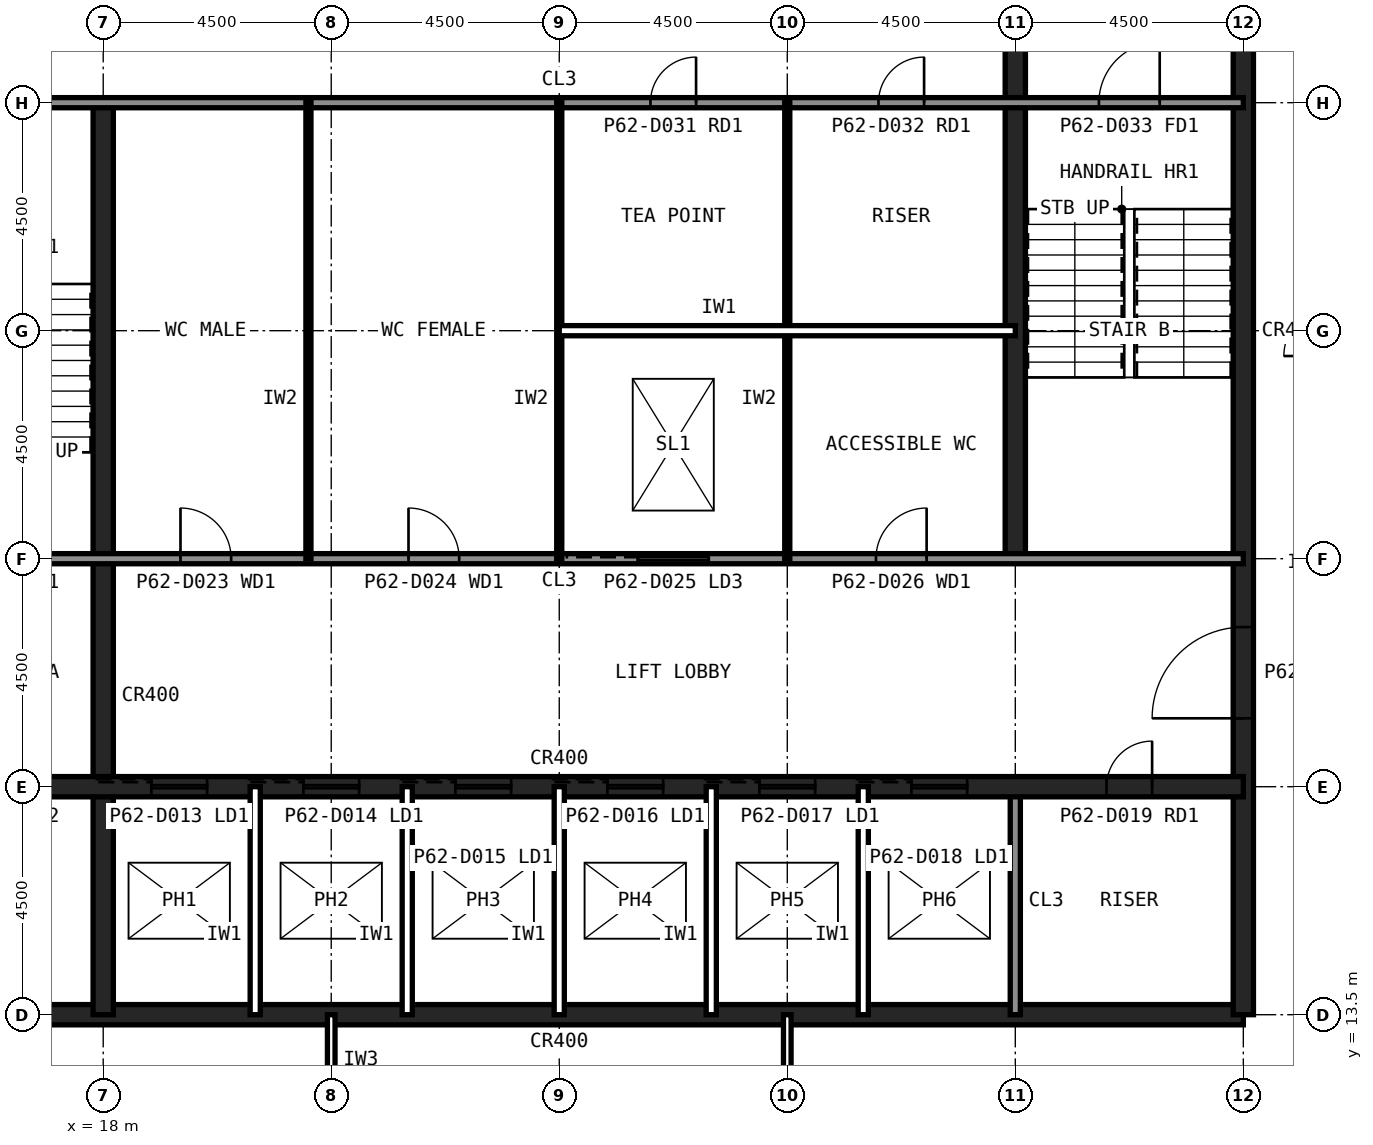
"""IFC4 building model, lengths in metres.
Left out: names, types, materials, properties, quantities, classifications, styles, units other than length and angle.
Written with IfcOpenShell. Run it as: python <this file> out.ifc"""

import sys

from ifc_helpers import new_model, si_unit, direction, frame, frame_2d, origin, place, context, subcontext, project, spatial, rectangle, extrude, element, fill, save


model = new_model("IFC4")
c1 = context("Model", 3, precision=1e-05, world=origin(), true_north=direction((0.0, 1.0)))
c2 = subcontext(c1, "Body", "Model", "MODEL_VIEW")
j1 = project(units=[si_unit("LENGTHUNIT", "METRE"), si_unit("PLANEANGLEUNIT", "RADIAN")], contexts=[c1])
p1 = place(None, origin())
s1 = spatial("IfcSite", under=j1, at=p1, CompositionType="ELEMENT")
p2 = place(p1, origin())
s2 = spatial("IfcBuilding", under=s1, at=p2, CompositionType="ELEMENT")
p3 = place(p2, frame((0.0, 0.0, 262.6)))
s3 = spatial("IfcBuildingStorey", under=s2, at=p3, CompositionType="ELEMENT", Elevation=262.6)
p4 = place(p3, frame((13.5, 13.5, 0.0), z_axis=(0.0, 0.0, 1.0), x_axis=(1.0, 0.0, 0.0)))
e1 = element("IfcWall", 1, at=p4, inside=s3, PredefinedType="SHEAR", context=c2, shape_type="SweptSolid", body=[
    extrude(rectangle(XDim=27.0, YDim=0.4, at=frame_2d((13.5, 0.0))), origin(), (0.0, 0.0, 1.0), 4.0),
])
p5 = place(p3, frame((40.5, 13.5, 0.0), z_axis=(0.0, 0.0, 1.0), x_axis=(0.0, 1.0, 0.0)))
e2 = element("IfcWall", 2, at=p5, inside=s3, PredefinedType="SHEAR", context=c2, shape_type="SweptSolid", body=[
    extrude(rectangle(XDim=27.0, YDim=0.4, at=frame_2d((13.5, 0.0))), origin(), (0.0, 0.0, 1.0), 4.0),
])
p6 = place(p5, frame((5.85, 0.0, 0.0)))
e3 = element("IfcOpeningElement", 3, at=p6, cuts=e2, PredefinedType="OPENING", context=c2, shape_type="SweptSolid", body=[
    extrude(rectangle(XDim=1.8, YDim=2.1, at=frame_2d((0.9, 1.05))), frame((0.0, 0.21, 0.0), z_axis=(0.0, -1.0, 0.0), x_axis=(1.0, 0.0, 0.0)), (0.0, 0.0, 1.0), 0.42),
])
p7 = place(p5, frame((19.65, 0.0, 0.0)))
e4 = element("IfcOpeningElement", 4, at=p7, cuts=e2, PredefinedType="OPENING", context=c2, shape_type="SweptSolid", body=[
    extrude(rectangle(XDim=1.2, YDim=2.1, at=frame_2d((0.6, 1.05))), frame((0.0, 0.21, 0.0), z_axis=(0.0, -1.0, 0.0), x_axis=(1.0, 0.0, 0.0)), (0.0, 0.0, 1.0), 0.42),
])
p8 = place(p3, frame((18.0, 13.5, 0.0), z_axis=(0.0, 0.0, 1.0), x_axis=(0.0, 1.0, 0.0)))
e5 = element("IfcWall", 5, at=p8, inside=s3, PredefinedType="SHEAR", context=c2, shape_type="SweptSolid", body=[
    extrude(rectangle(XDim=18.0, YDim=0.4, at=frame_2d((9.0, 0.0))), origin(), (0.0, 0.0, 1.0), 4.0),
])
p9 = place(p3, frame((36.0, 13.5, 0.0), z_axis=(0.0, 0.0, 1.0), x_axis=(0.0, 1.0, 0.0)))
e6 = element("IfcWall", 6, at=p9, inside=s3, PredefinedType="SOLIDWALL", context=c2, shape_type="SweptSolid", body=[
    extrude(rectangle(XDim=4.5, YDim=0.2, at=frame_2d((2.25, 0.0))), origin(), (0.0, 0.0, 1.0), 3.84),
])
p10 = place(p3, frame((36.0, 22.5, 0.0), z_axis=(0.0, 0.0, 1.0), x_axis=(0.0, 1.0, 0.0)))
e7 = element("IfcWall", 7, at=p10, inside=s3, PredefinedType="SHEAR", context=c2, shape_type="SweptSolid", body=[
    extrude(rectangle(XDim=18.0, YDim=0.4, at=frame_2d((9.0, 0.0))), origin(), (0.0, 0.0, 1.0), 4.0),
])
p11 = place(p3, frame((13.5, 18.0, 0.0), z_axis=(0.0, 0.0, 1.0), x_axis=(1.0, 0.0, 0.0)))
e8 = element("IfcWall", 8, at=p11, inside=s3, PredefinedType="SHEAR", context=c2, shape_type="SweptSolid", body=[
    extrude(rectangle(XDim=27.0, YDim=0.4, at=frame_2d((13.5, 0.0))), origin(), (0.0, 0.0, 1.0), 4.0),
])
p12 = place(p11, frame((24.3, 0.0, 0.0)))
e9 = element("IfcOpeningElement", 9, at=p12, cuts=e8, PredefinedType="OPENING", context=c2, shape_type="SweptSolid", body=[
    extrude(rectangle(XDim=0.9, YDim=2.1, at=frame_2d((0.45, 1.05))), frame((0.0, 0.21, 0.0), z_axis=(0.0, -1.0, 0.0), x_axis=(1.0, 0.0, 0.0)), (0.0, 0.0, 1.0), 0.42),
])
p13 = place(p11, frame((5.45, 0.0, 0.0)))
e10 = element("IfcOpeningElement", 10, at=p13, cuts=e8, PredefinedType="OPENING", context=c2, shape_type="SweptSolid", body=[
    extrude(rectangle(XDim=1.1, YDim=2.1, at=frame_2d((0.55, 1.05))), frame((0.0, 0.21, 0.0), z_axis=(0.0, -1.0, 0.0), x_axis=(1.0, 0.0, 0.0)), (0.0, 0.0, 1.0), 0.42),
])
p14 = place(p11, frame((8.45, 0.0, 0.0)))
e11 = element("IfcOpeningElement", 11, at=p14, cuts=e8, PredefinedType="OPENING", context=c2, shape_type="SweptSolid", body=[
    extrude(rectangle(XDim=1.1, YDim=2.1, at=frame_2d((0.55, 1.05))), frame((0.0, 0.21, 0.0), z_axis=(0.0, -1.0, 0.0), x_axis=(1.0, 0.0, 0.0)), (0.0, 0.0, 1.0), 0.42),
])
p15 = place(p11, frame((11.45, 0.0, 0.0)))
e12 = element("IfcOpeningElement", 12, at=p15, cuts=e8, PredefinedType="OPENING", context=c2, shape_type="SweptSolid", body=[
    extrude(rectangle(XDim=1.1, YDim=2.1, at=frame_2d((0.55, 1.05))), frame((0.0, 0.21, 0.0), z_axis=(0.0, -1.0, 0.0), x_axis=(1.0, 0.0, 0.0)), (0.0, 0.0, 1.0), 0.42),
])
p16 = place(p11, frame((14.45, 0.0, 0.0)))
e13 = element("IfcOpeningElement", 13, at=p16, cuts=e8, PredefinedType="OPENING", context=c2, shape_type="SweptSolid", body=[
    extrude(rectangle(XDim=1.1, YDim=2.1, at=frame_2d((0.55, 1.05))), frame((0.0, 0.21, 0.0), z_axis=(0.0, -1.0, 0.0), x_axis=(1.0, 0.0, 0.0)), (0.0, 0.0, 1.0), 0.42),
])
p17 = place(p11, frame((17.45, 0.0, 0.0)))
e14 = element("IfcOpeningElement", 14, at=p17, cuts=e8, PredefinedType="OPENING", context=c2, shape_type="SweptSolid", body=[
    extrude(rectangle(XDim=1.1, YDim=2.1, at=frame_2d((0.55, 1.05))), frame((0.0, 0.21, 0.0), z_axis=(0.0, -1.0, 0.0), x_axis=(1.0, 0.0, 0.0)), (0.0, 0.0, 1.0), 0.42),
])
p18 = place(p11, frame((20.45, 0.0, 0.0)))
e15 = element("IfcOpeningElement", 15, at=p18, cuts=e8, PredefinedType="OPENING", context=c2, shape_type="SweptSolid", body=[
    extrude(rectangle(XDim=1.1, YDim=2.1, at=frame_2d((0.55, 1.05))), frame((0.0, 0.21, 0.0), z_axis=(0.0, -1.0, 0.0), x_axis=(1.0, 0.0, 0.0)), (0.0, 0.0, 1.0), 0.42),
])
p19 = place(p11, frame((1.6, 0.0, 0.0)))
e16 = element("IfcOpeningElement", 16, at=p19, cuts=e8, PredefinedType="OPENING", context=c2, shape_type="SweptSolid", body=[
    extrude(rectangle(XDim=1.3, YDim=2.2, at=frame_2d((0.65, 1.1))), frame((0.0, 0.21, 0.0), z_axis=(0.0, -1.0, 0.0), x_axis=(1.0, 0.0, 0.0)), (0.0, 0.0, 1.0), 0.42),
])
p20 = place(p3, frame((13.5, 22.5, 0.0), z_axis=(0.0, 0.0, 1.0), x_axis=(1.0, 0.0, 0.0)))
e17 = element("IfcWall", 17, at=p20, inside=s3, PredefinedType="SOLIDWALL", context=c2, shape_type="SweptSolid", body=[
    extrude(rectangle(XDim=27.0, YDim=0.2, at=frame_2d((13.5, 0.0))), origin(), (0.0, 0.0, 1.0), 3.84),
])
p21 = place(p20, frame((1.65, 0.0, 0.0)))
e18 = element("IfcOpeningElement", 18, at=p21, cuts=e17, PredefinedType="OPENING", context=c2, shape_type="SweptSolid", body=[
    extrude(rectangle(XDim=1.2, YDim=2.1, at=frame_2d((0.6, 1.05))), frame((0.0, 0.11, 0.0), z_axis=(0.0, -1.0, 0.0), x_axis=(1.0, 0.0, 0.0)), (0.0, 0.0, 1.0), 0.22),
])
p22 = place(p20, frame((6.025, 0.0, 0.0)))
e19 = element("IfcOpeningElement", 19, at=p22, cuts=e17, PredefinedType="OPENING", context=c2, shape_type="SweptSolid", body=[
    extrude(rectangle(XDim=1.0, YDim=2.1, at=frame_2d((0.5, 1.05))), frame((0.0, 0.11, 0.0), z_axis=(0.0, -1.0, 0.0), x_axis=(1.0, 0.0, 0.0)), (0.0, 0.0, 1.0), 0.22),
])
p23 = place(p20, frame((10.525, 0.0, 0.0)))
e20 = element("IfcOpeningElement", 20, at=p23, cuts=e17, PredefinedType="OPENING", context=c2, shape_type="SweptSolid", body=[
    extrude(rectangle(XDim=1.0, YDim=2.1, at=frame_2d((0.5, 1.05))), frame((0.0, 0.11, 0.0), z_axis=(0.0, -1.0, 0.0), x_axis=(1.0, 0.0, 0.0)), (0.0, 0.0, 1.0), 0.22),
])
p24 = place(p20, frame((19.75, 0.0, 0.0)))
e21 = element("IfcOpeningElement", 21, at=p24, cuts=e17, PredefinedType="OPENING", context=c2, shape_type="SweptSolid", body=[
    extrude(rectangle(XDim=1.0, YDim=2.1, at=frame_2d((0.5, 1.05))), frame((0.0, 0.11, 0.0), z_axis=(0.0, -1.0, 0.0), x_axis=(1.0, 0.0, 0.0)), (0.0, 0.0, 1.0), 0.22),
])
p25 = place(p20, frame((15.05, 0.0, 0.0)))
e22 = element("IfcOpeningElement", 22, at=p25, cuts=e17, PredefinedType="OPENING", context=c2, shape_type="SweptSolid", body=[
    extrude(rectangle(XDim=1.4, YDim=2.4, at=frame_2d((0.7, 1.2))), frame((0.0, 0.11, 0.0), z_axis=(0.0, -1.0, 0.0), x_axis=(1.0, 0.0, 0.0)), (0.0, 0.0, 1.0), 0.22),
])
p26 = place(p3, frame((13.5, 31.5, 0.0), z_axis=(0.0, 0.0, 1.0), x_axis=(1.0, 0.0, 0.0)))
e23 = element("IfcWall", 23, at=p26, inside=s3, PredefinedType="SOLIDWALL", context=c2, shape_type="SweptSolid", body=[
    extrude(rectangle(XDim=27.0, YDim=0.2, at=frame_2d((13.5, 0.0))), origin(), (0.0, 0.0, 1.0), 3.84),
])
p27 = place(p26, frame((24.15, 0.0, 0.0)))
e24 = element("IfcOpeningElement", 24, at=p27, cuts=e23, PredefinedType="OPENING", context=c2, shape_type="SweptSolid", body=[
    extrude(rectangle(XDim=1.2, YDim=2.1, at=frame_2d((0.6, 1.05))), frame((0.0, 0.11, 0.0), z_axis=(0.0, -1.0, 0.0), x_axis=(1.0, 0.0, 0.0)), (0.0, 0.0, 1.0), 0.22),
])
p28 = place(p26, frame((15.3, 0.0, 0.0)))
e25 = element("IfcOpeningElement", 25, at=p28, cuts=e23, PredefinedType="OPENING", context=c2, shape_type="SweptSolid", body=[
    extrude(rectangle(XDim=0.9, YDim=2.1, at=frame_2d((0.45, 1.05))), frame((0.0, 0.11, 0.0), z_axis=(0.0, -1.0, 0.0), x_axis=(1.0, 0.0, 0.0)), (0.0, 0.0, 1.0), 0.22),
])
p29 = place(p26, frame((19.8, 0.0, 0.0)))
e26 = element("IfcOpeningElement", 26, at=p29, cuts=e23, PredefinedType="OPENING", context=c2, shape_type="SweptSolid", body=[
    extrude(rectangle(XDim=0.9, YDim=2.1, at=frame_2d((0.45, 1.05))), frame((0.0, 0.11, 0.0), z_axis=(0.0, -1.0, 0.0), x_axis=(1.0, 0.0, 0.0)), (0.0, 0.0, 1.0), 0.22),
])
for number, where, z_axis, x_axis in (
    (27, (21.0, 13.5, 0.0), (0.0, 0.0, 1.0), (0.0, 1.0, 0.0)),
    (28, (24.0, 13.5, 0.0), (0.0, 0.0, 1.0), (0.0, 1.0, 0.0)),
    (29, (27.0, 13.5, 0.0), (0.0, 0.0, 1.0), (0.0, 1.0, 0.0)),
    (30, (30.0, 13.5, 0.0), (0.0, 0.0, 1.0), (0.0, 1.0, 0.0)),
    (31, (33.0, 13.5, 0.0), (0.0, 0.0, 1.0), (0.0, 1.0, 0.0)),
):
    element("IfcWall", number, at=place(p3, frame(where, z_axis=z_axis, x_axis=x_axis)), inside=s3, PredefinedType="PARTITIONING", context=c2, shape_type="SweptSolid", body=[
        extrude(rectangle(XDim=4.5, YDim=0.2, at=frame_2d((2.25, 0.0))), origin(), (0.0, 0.0, 1.0), 3.84),
    ])
for number, where, z_axis, x_axis in (
    (32, (22.05, 22.5, 0.0), (0.0, 0.0, 1.0), (0.0, 1.0, 0.0)),
    (33, (27.0, 22.5, 0.0), (0.0, 0.0, 1.0), (0.0, 1.0, 0.0)),
    (34, (31.5, 22.5, 0.0), (0.0, 0.0, 1.0), (0.0, 1.0, 0.0)),
):
    element("IfcWall", number, at=place(p3, frame(where, z_axis=z_axis, x_axis=x_axis)), inside=s3, PredefinedType="PLUMBINGWALL", context=c2, shape_type="SweptSolid", body=[
        extrude(rectangle(XDim=9.0, YDim=0.1, at=frame_2d((4.5, 0.0))), origin(), (0.0, 0.0, 1.0), 3.84),
    ])
p30 = place(p3, frame((27.0, 27.0, 0.0), z_axis=(0.0, 0.0, 1.0), x_axis=(1.0, 0.0, 0.0)))
e35 = element("IfcWall", 35, at=p30, inside=s3, PredefinedType="PARTITIONING", context=c2, shape_type="SweptSolid", body=[
    extrude(rectangle(XDim=9.0, YDim=0.2, at=frame_2d((4.5, 0.0))), origin(), (0.0, 0.0, 1.0), 3.84),
])
p31 = place(p3, frame((31.5, 9.0, 0.0), z_axis=(0.0, 0.0, 1.0), x_axis=(0.0, 1.0, 0.0)))
e36 = element("IfcWall", 36, at=p31, inside=s3, PredefinedType="PARTITIONING", context=c2, shape_type="SweptSolid", body=[
    extrude(rectangle(XDim=4.5, YDim=0.15, at=frame_2d((2.25, 0.0))), origin(), (0.0, 0.0, 1.0), 2.989),
])
p32 = place(p3, frame((22.5, 13.5, 0.0), z_axis=(0.0, 0.0, 1.0), x_axis=(0.0, -1.0, 0.0)))
e37 = element("IfcWall", 37, at=p32, inside=s3, PredefinedType="PARTITIONING", context=c2, shape_type="SweptSolid", body=[
    extrude(rectangle(XDim=4.5, YDim=0.15, at=frame_2d((2.25, 0.0))), origin(), (0.0, 0.0, 1.0), 2.989),
])
p33 = place(p32, frame((1.75, 0.0, 0.0)))
e38 = element("IfcOpeningElement", 38, at=p33, cuts=e37, PredefinedType="OPENING", context=c2, shape_type="SweptSolid", body=[
    extrude(rectangle(XDim=1.0, YDim=2.1, at=frame_2d((0.5, 1.05))), frame((0.0, 0.085, 0.0), z_axis=(0.0, -1.0, 0.0), x_axis=(1.0, 0.0, 0.0)), (0.0, 0.0, 1.0), 0.17),
])
p34 = place(p6, origin())
e39 = element("IfcDoor", 39, at=p34, inside=s3, OperationType="SINGLE_SWING_LEFT", PredefinedType="DOOR", context=c2, shape_type="SweptSolid", body=[
    extrude(rectangle(XDim=1.8, YDim=2.1, at=frame_2d((0.9, 1.05))), frame((0.0, 0.025, 0.0), z_axis=(0.0, -1.0, 0.0), x_axis=(1.0, 0.0, 0.0)), (0.0, 0.0, 1.0), 0.05),
])
fill(e3, e39)
p35 = place(p27, origin())
e40 = element("IfcDoor", 40, at=p35, inside=s3, OperationType="SINGLE_SWING_RIGHT", PredefinedType="DOOR", context=c2, shape_type="SweptSolid", body=[
    extrude(rectangle(XDim=1.2, YDim=2.1, at=frame_2d((0.6, 1.05))), frame((0.0, 0.025, 0.0), z_axis=(0.0, -1.0, 0.0), x_axis=(1.0, 0.0, 0.0)), (0.0, 0.0, 1.0), 0.05),
])
fill(e24, e40)
p36 = place(p22, origin())
e41 = element("IfcDoor", 41, at=p36, inside=s3, OperationType="SINGLE_SWING_LEFT", PredefinedType="DOOR", context=c2, shape_type="SweptSolid", body=[
    extrude(rectangle(XDim=1.0, YDim=2.1, at=frame_2d((0.5, 1.05))), frame((0.0, 0.025, 0.0), z_axis=(0.0, -1.0, 0.0), x_axis=(1.0, 0.0, 0.0)), (0.0, 0.0, 1.0), 0.05),
])
fill(e19, e41)
p37 = place(p23, origin())
e42 = element("IfcDoor", 42, at=p37, inside=s3, OperationType="SINGLE_SWING_LEFT", PredefinedType="DOOR", context=c2, shape_type="SweptSolid", body=[
    extrude(rectangle(XDim=1.0, YDim=2.1, at=frame_2d((0.5, 1.05))), frame((0.0, 0.025, 0.0), z_axis=(0.0, -1.0, 0.0), x_axis=(1.0, 0.0, 0.0)), (0.0, 0.0, 1.0), 0.05),
])
fill(e20, e42)
p38 = place(p24, origin())
e43 = element("IfcDoor", 43, at=p38, inside=s3, OperationType="SINGLE_SWING_RIGHT", PredefinedType="DOOR", context=c2, shape_type="SweptSolid", body=[
    extrude(rectangle(XDim=1.0, YDim=2.1, at=frame_2d((0.5, 1.05))), frame((0.0, 0.025, 0.0), z_axis=(0.0, -1.0, 0.0), x_axis=(1.0, 0.0, 0.0)), (0.0, 0.0, 1.0), 0.05),
])
fill(e21, e43)
p39 = place(p28, origin())
e44 = element("IfcDoor", 44, at=p39, inside=s3, OperationType="SINGLE_SWING_RIGHT", PredefinedType="DOOR", context=c2, shape_type="SweptSolid", body=[
    extrude(rectangle(XDim=0.9, YDim=2.1, at=frame_2d((0.45, 1.05))), frame((0.0, 0.025, 0.0), z_axis=(0.0, -1.0, 0.0), x_axis=(1.0, 0.0, 0.0)), (0.0, 0.0, 1.0), 0.05),
])
fill(e25, e44)
p40 = place(p29, origin())
e45 = element("IfcDoor", 45, at=p40, inside=s3, OperationType="SINGLE_SWING_RIGHT", PredefinedType="DOOR", context=c2, shape_type="SweptSolid", body=[
    extrude(rectangle(XDim=0.9, YDim=2.1, at=frame_2d((0.45, 1.05))), frame((0.0, 0.025, 0.0), z_axis=(0.0, -1.0, 0.0), x_axis=(1.0, 0.0, 0.0)), (0.0, 0.0, 1.0), 0.05),
])
fill(e26, e45)
p41 = place(p12, origin())
e46 = element("IfcDoor", 46, at=p41, inside=s3, OperationType="SINGLE_SWING_RIGHT", PredefinedType="DOOR", context=c2, shape_type="SweptSolid", body=[
    extrude(rectangle(XDim=0.9, YDim=2.1, at=frame_2d((0.45, 1.05))), frame((0.0, 0.025, 0.0), z_axis=(0.0, -1.0, 0.0), x_axis=(1.0, 0.0, 0.0)), (0.0, 0.0, 1.0), 0.05),
])
fill(e9, e46)
p42 = place(p13, origin())
e47 = element("IfcDoor", 47, at=p42, inside=s3, OperationType="SLIDING_TO_LEFT", PredefinedType="DOOR", context=c2, shape_type="SweptSolid", body=[
    extrude(rectangle(XDim=1.1, YDim=2.1, at=frame_2d((0.55, 1.05))), frame((0.0, 0.025, 0.0), z_axis=(0.0, -1.0, 0.0), x_axis=(1.0, 0.0, 0.0)), (0.0, 0.0, 1.0), 0.05),
])
fill(e10, e47)
p43 = place(p14, origin())
e48 = element("IfcDoor", 48, at=p43, inside=s3, OperationType="SLIDING_TO_LEFT", PredefinedType="DOOR", context=c2, shape_type="SweptSolid", body=[
    extrude(rectangle(XDim=1.1, YDim=2.1, at=frame_2d((0.55, 1.05))), frame((0.0, 0.025, 0.0), z_axis=(0.0, -1.0, 0.0), x_axis=(1.0, 0.0, 0.0)), (0.0, 0.0, 1.0), 0.05),
])
fill(e11, e48)
p44 = place(p15, origin())
e49 = element("IfcDoor", 49, at=p44, inside=s3, OperationType="SLIDING_TO_LEFT", PredefinedType="DOOR", context=c2, shape_type="SweptSolid", body=[
    extrude(rectangle(XDim=1.1, YDim=2.1, at=frame_2d((0.55, 1.05))), frame((0.0, 0.025, 0.0), z_axis=(0.0, -1.0, 0.0), x_axis=(1.0, 0.0, 0.0)), (0.0, 0.0, 1.0), 0.05),
])
fill(e12, e49)
p45 = place(p16, origin())
e50 = element("IfcDoor", 50, at=p45, inside=s3, OperationType="SLIDING_TO_LEFT", PredefinedType="DOOR", context=c2, shape_type="SweptSolid", body=[
    extrude(rectangle(XDim=1.1, YDim=2.1, at=frame_2d((0.55, 1.05))), frame((0.0, 0.025, 0.0), z_axis=(0.0, -1.0, 0.0), x_axis=(1.0, 0.0, 0.0)), (0.0, 0.0, 1.0), 0.05),
])
fill(e13, e50)
p46 = place(p17, origin())
e51 = element("IfcDoor", 51, at=p46, inside=s3, OperationType="SLIDING_TO_LEFT", PredefinedType="DOOR", context=c2, shape_type="SweptSolid", body=[
    extrude(rectangle(XDim=1.1, YDim=2.1, at=frame_2d((0.55, 1.05))), frame((0.0, 0.025, 0.0), z_axis=(0.0, -1.0, 0.0), x_axis=(1.0, 0.0, 0.0)), (0.0, 0.0, 1.0), 0.05),
])
fill(e14, e51)
p47 = place(p18, origin())
e52 = element("IfcDoor", 52, at=p47, inside=s3, OperationType="SLIDING_TO_LEFT", PredefinedType="DOOR", context=c2, shape_type="SweptSolid", body=[
    extrude(rectangle(XDim=1.1, YDim=2.1, at=frame_2d((0.55, 1.05))), frame((0.0, 0.025, 0.0), z_axis=(0.0, -1.0, 0.0), x_axis=(1.0, 0.0, 0.0)), (0.0, 0.0, 1.0), 0.05),
])
fill(e15, e52)
p48 = place(p25, origin())
e53 = element("IfcDoor", 53, at=p48, inside=s3, OperationType="SLIDING_TO_LEFT", PredefinedType="DOOR", context=c2, shape_type="SweptSolid", body=[
    extrude(rectangle(XDim=1.4, YDim=2.4, at=frame_2d((0.7, 1.2))), frame((0.0, 0.025, 0.0), z_axis=(0.0, -1.0, 0.0), x_axis=(1.0, 0.0, 0.0)), (0.0, 0.0, 1.0), 0.05),
])
fill(e22, e53)
save(model, sys.argv[1])
